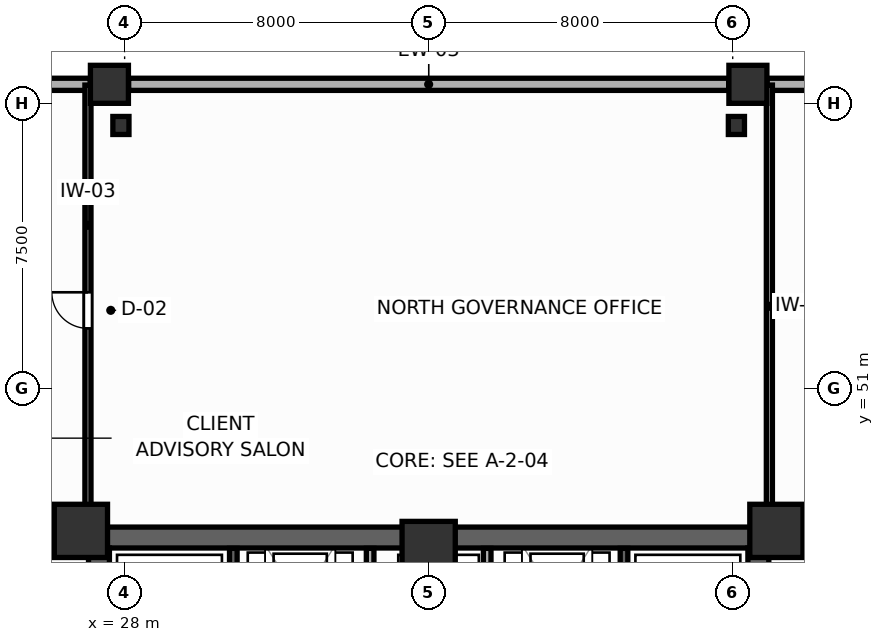
"""IFC4 building model, lengths in metres.
Left out: names, types, materials, properties, quantities, classifications, styles, units other than length and angle.
Written with IfcOpenShell. Run it as: python <this file> out.ifc"""

import sys

from ifc_helpers import new_model, si_unit, direction, frame, frame_2d, origin, origin_2d, place, context, subcontext, project, spatial, rectangle, i_section, extrude, source, transform, mapped, element, fill, save


model = new_model("IFC4")
c1 = context("Model", 3, precision=1e-05, world=origin(), true_north=direction((0.0, 1.0)))
c2 = subcontext(c1, "Body", "Model", "MODEL_VIEW")
j1 = project(units=[si_unit("LENGTHUNIT", "METRE"), si_unit("PLANEANGLEUNIT", "RADIAN")], contexts=[c1])
p1 = place(None, origin())
s1 = spatial("IfcSite", under=j1, at=p1, CompositionType="ELEMENT")
p2 = place(p1, origin())
s2 = spatial("IfcBuilding", under=s1, at=p2, CompositionType="ELEMENT")
p3 = place(p2, frame((0.0, 0.0, 4.8)))
s3 = spatial("IfcBuildingStorey", under=s2, at=p3, CompositionType="ELEMENT", Elevation=4.8)
p4 = place(p3, frame((27.05, 47.075, 0.0), z_axis=(0.0, 0.0, 1.0), x_axis=(1.0, 0.0, 0.0)))
e1 = element("IfcWall", 1, at=p4, inside=s3, PredefinedType="SHEAR", context=c2, shape_type="SweptSolid", body=[
    extrude(rectangle(XDim=17.9, YDim=0.55, at=frame_2d((8.95, 0.0))), origin(), (0.0, 0.0, 1.0), 4.8),
])
for number, where, z_axis, x_axis in (
    (2, (27.325, 37.8, 0.0), (0.0, 0.0, 1.0), (0.0, 1.0, 0.0)),
    (3, (44.675, 37.8, 0.0), (0.0, 0.0, 1.0), (0.0, 1.0, 0.0)),
):
    element("IfcWall", number, at=place(p3, frame(where, z_axis=z_axis, x_axis=x_axis)), inside=s3, PredefinedType="SHEAR", context=c2, shape_type="SweptSolid", body=[
        extrude(rectangle(XDim=9.0, YDim=0.55, at=frame_2d((4.5, 0.0))), origin(), (0.0, 0.0, 1.0), 4.8),
    ])
m1 = source(origin(), c2, "Body", "SweptSolid", [
    extrude(rectangle(XDim=1.4, YDim=1.4, at=origin_2d()), origin(), (0.0, 0.0, 1.0), 4.8),
])
for number, where, z_axis, x_axis in (
    (4, (26.85, 47.25, 0.0), (0.0, 0.0, 1.0), (1.0, 0.0, 0.0)),
    (5, (45.15, 47.25, 0.0), (0.0, 0.0, 1.0), (1.0, 0.0, 0.0)),
    (6, (36.0, 46.8, 0.0), (0.0, 0.0, 1.0), (1.0, 0.0, 0.0)),
):
    element("IfcColumn", number, at=place(p3, frame(where, z_axis=z_axis, x_axis=x_axis)), inside=s3, PredefinedType="COLUMN", context=c2, shape_type="MappedRepresentation", body=[
        mapped(m1, transform((0.0, 0.0, 0.0), scale=1.0)),
    ])
m2 = source(origin(), c2, "Body", "SweptSolid", [
    extrude(rectangle(XDim=1.0, YDim=1.0, at=origin_2d()), origin(), (0.0, 0.0, 1.0), 4.8),
])
for number, where, z_axis, x_axis in (
    (7, (27.6, 59.0, 0.0), (0.0, 0.0, 1.0), (1.0, 0.0, 0.0)),
    (8, (44.4, 59.0, 0.0), (0.0, 0.0, 1.0), (1.0, 0.0, 0.0)),
):
    element("IfcColumn", number, at=place(p3, frame(where, z_axis=z_axis, x_axis=x_axis)), inside=s3, PredefinedType="COLUMN", context=c2, shape_type="MappedRepresentation", body=[
        mapped(m2, transform((0.0, 0.0, 0.0), scale=1.0)),
    ])
m3 = source(origin(), c2, "Body", "SweptSolid", [
    extrude(i_section(OverallWidth=0.424, OverallDepth=0.474, WebThickness=0.045, FlangeThickness=0.072, FilletRadius=0.015, at=origin_2d()), origin(), (0.0, 0.0, 1.0), 4.8),
])
for number, where, z_axis, x_axis in (
    (9, (44.097, 57.917, 0.0), (0.0, 0.0, 1.0), (1.0, 0.0, 0.0)),
    (10, (27.903, 57.917, 0.0), (0.0, 0.0, 1.0), (1.0, 0.0, 0.0)),
):
    element("IfcColumn", number, at=place(p3, frame(where, z_axis=z_axis, x_axis=x_axis)), inside=s3, PredefinedType="COLUMN", context=c2, shape_type="MappedRepresentation", body=[
        mapped(m3, transform((0.0, 0.0, 0.0), scale=1.0)),
    ])
p5 = place(p3, frame((14.505, 59.0, 0.0), z_axis=(0.0, 0.0, 1.0), x_axis=(1.0, 0.0, 0.0)))
e11 = element("IfcWall", 11, at=p5, inside=s3, PredefinedType="SOLIDWALL", context=c2, shape_type="SweptSolid", body=[
    extrude(rectangle(XDim=12.59, YDim=0.32, at=frame_2d((6.295, 0.0))), origin(), (0.0, 0.0, 1.0), 3.82),
])
p6 = place(p5, frame((1.599, 0.0, 0.75)))
e12 = element("IfcOpeningElement", 12, at=p6, cuts=e11, PredefinedType="OPENING", context=c2, shape_type="SweptSolid", body=[
    extrude(rectangle(XDim=2.2, YDim=2.0, at=frame_2d((1.1, 1.0))), frame((0.0, 0.17, 0.0), z_axis=(0.0, -1.0, 0.0), x_axis=(1.0, 0.0, 0.0)), (0.0, 0.0, 1.0), 0.34),
])
p7 = place(p3, frame((28.105, 59.0, 0.0), z_axis=(0.0, 0.0, 1.0), x_axis=(1.0, 0.0, 0.0)))
e13 = element("IfcWall", 13, at=p7, inside=s3, PredefinedType="SOLIDWALL", context=c2, shape_type="SweptSolid", body=[
    extrude(rectangle(XDim=15.79, YDim=0.32, at=frame_2d((7.895, 0.0))), origin(), (0.0, 0.0, 1.0), 3.82),
])
p8 = place(p3, frame((44.905, 59.0, 0.0), z_axis=(0.0, 0.0, 1.0), x_axis=(1.0, 0.0, 0.0)))
e14 = element("IfcWall", 14, at=p8, inside=s3, PredefinedType="SOLIDWALL", context=c2, shape_type="SweptSolid", body=[
    extrude(rectangle(XDim=12.59, YDim=0.32, at=frame_2d((6.295, 0.0))), origin(), (0.0, 0.0, 1.0), 3.82),
])
p9 = place(p8, frame((5.195, 0.0, 0.75)))
e15 = element("IfcOpeningElement", 15, at=p9, cuts=e14, PredefinedType="OPENING", context=c2, shape_type="SweptSolid", body=[
    extrude(rectangle(XDim=2.2, YDim=2.0, at=frame_2d((1.1, 1.0))), frame((0.0, 0.17, 0.0), z_axis=(0.0, -1.0, 0.0), x_axis=(1.0, 0.0, 0.0)), (0.0, 0.0, 1.0), 0.34),
])
p10 = place(p3, frame((30.86, 37.81, 0.0), z_axis=(0.0, 0.0, 1.0), x_axis=(0.0, 1.0, 0.0)))
e16 = element("IfcWall", 16, at=p10, inside=s3, PredefinedType="SHEAR", context=c2, shape_type="SweptSolid", body=[
    extrude(rectangle(XDim=8.98, YDim=0.2, at=frame_2d((4.49, 0.0))), origin(), (0.0, 0.0, 1.0), 4.8),
])
p11 = place(p10, frame((0.82, 0.0, 0.0)))
e17 = element("IfcOpeningElement", 17, at=p11, cuts=e16, PredefinedType="OPENING", context=c2, shape_type="SweptSolid", body=[
    extrude(rectangle(XDim=1.05, YDim=2.1, at=frame_2d((0.525, 1.05))), frame((0.0, 0.11, 0.0), z_axis=(0.0, -1.0, 0.0), x_axis=(1.0, 0.0, 0.0)), (0.0, 0.0, 1.0), 0.22),
])
p12 = place(p3, frame((41.14, 37.81, 0.0), z_axis=(0.0, 0.0, 1.0), x_axis=(0.0, 1.0, 0.0)))
e18 = element("IfcWall", 18, at=p12, inside=s3, PredefinedType="SHEAR", context=c2, shape_type="SweptSolid", body=[
    extrude(rectangle(XDim=8.98, YDim=0.2, at=frame_2d((4.49, 0.0))), origin(), (0.0, 0.0, 1.0), 4.8),
])
p13 = place(p12, frame((0.82, 0.0, 0.0)))
e19 = element("IfcOpeningElement", 19, at=p13, cuts=e18, PredefinedType="OPENING", context=c2, shape_type="SweptSolid", body=[
    extrude(rectangle(XDim=1.05, YDim=2.1, at=frame_2d((0.525, 1.05))), frame((0.0, 0.11, 0.0), z_axis=(0.0, -1.0, 0.0), x_axis=(1.0, 0.0, 0.0)), (0.0, 0.0, 1.0), 0.22),
])
p14 = place(p3, frame((34.46, 37.81, 0.0), z_axis=(0.0, 0.0, 1.0), x_axis=(0.0, 1.0, 0.0)))
e20 = element("IfcWall", 20, at=p14, inside=s3, PredefinedType="PARTITIONING", context=c2, shape_type="SweptSolid", body=[
    extrude(rectangle(XDim=8.98, YDim=0.2, at=frame_2d((4.49, 0.0))), origin(), (0.0, 0.0, 1.0), 4.52),
])
p15 = place(p14, frame((0.65, 0.0, 0.0)))
e21 = element("IfcOpeningElement", 21, at=p15, cuts=e20, PredefinedType="OPENING", context=c2, shape_type="SweptSolid", body=[
    extrude(rectangle(XDim=0.85, YDim=2.05, at=frame_2d((0.425, 1.025))), frame((0.0, 0.11, 0.0), z_axis=(0.0, -1.0, 0.0), x_axis=(1.0, 0.0, 0.0)), (0.0, 0.0, 1.0), 0.22),
])
p16 = place(p3, frame((37.54, 37.81, 0.0), z_axis=(0.0, 0.0, 1.0), x_axis=(0.0, 1.0, 0.0)))
e22 = element("IfcWall", 22, at=p16, inside=s3, PredefinedType="PARTITIONING", context=c2, shape_type="SweptSolid", body=[
    extrude(rectangle(XDim=8.98, YDim=0.2, at=frame_2d((4.49, 0.0))), origin(), (0.0, 0.0, 1.0), 4.52),
])
p17 = place(p16, frame((0.65, 0.0, 0.0)))
e23 = element("IfcOpeningElement", 23, at=p17, cuts=e22, PredefinedType="OPENING", context=c2, shape_type="SweptSolid", body=[
    extrude(rectangle(XDim=0.85, YDim=2.05, at=frame_2d((0.425, 1.025))), frame((0.0, 0.11, 0.0), z_axis=(0.0, -1.0, 0.0), x_axis=(1.0, 0.0, 0.0)), (0.0, 0.0, 1.0), 0.22),
])
p18 = place(p3, frame((27.035, 47.34, 0.0), z_axis=(0.0, 0.0, 1.0), x_axis=(0.0, 1.0, 0.0)))
e24 = element("IfcWall", 24, at=p18, inside=s3, PredefinedType="PARTITIONING", context=c2, shape_type="SweptSolid", body=[
    extrude(rectangle(XDim=11.64, YDim=0.16, at=frame_2d((5.82, 0.0))), origin(), (0.0, 0.0, 1.0), 4.52),
])
p19 = place(p18, frame((5.238, 0.0, 0.0)))
e25 = element("IfcOpeningElement", 25, at=p19, cuts=e24, PredefinedType="OPENING", context=c2, shape_type="SweptSolid", body=[
    extrude(rectangle(XDim=0.95, YDim=2.05, at=frame_2d((0.475, 1.025))), frame((0.0, 0.09, 0.0), z_axis=(0.0, -1.0, 0.0), x_axis=(1.0, 0.0, 0.0)), (0.0, 0.0, 1.0), 0.18),
])
p20 = place(p3, frame((44.965, 47.34, 0.0), z_axis=(0.0, 0.0, 1.0), x_axis=(0.0, 1.0, 0.0)))
e26 = element("IfcWall", 26, at=p20, inside=s3, PredefinedType="PARTITIONING", context=c2, shape_type="SweptSolid", body=[
    extrude(rectangle(XDim=11.64, YDim=0.16, at=frame_2d((5.82, 0.0))), origin(), (0.0, 0.0, 1.0), 4.52),
])
p21 = place(p19, origin())
e27 = element("IfcDoor", 27, at=p21, inside=s3, OperationType="SINGLE_SWING_RIGHT", PredefinedType="DOOR", context=c2, shape_type="SweptSolid", body=[
    extrude(rectangle(XDim=0.95, YDim=2.05, at=frame_2d((0.475, 1.025))), frame((0.0, 0.025, 0.0), z_axis=(0.0, -1.0, 0.0), x_axis=(1.0, 0.0, 0.0)), (0.0, 0.0, 1.0), 0.05),
])
fill(e25, e27)
save(model, sys.argv[1])
